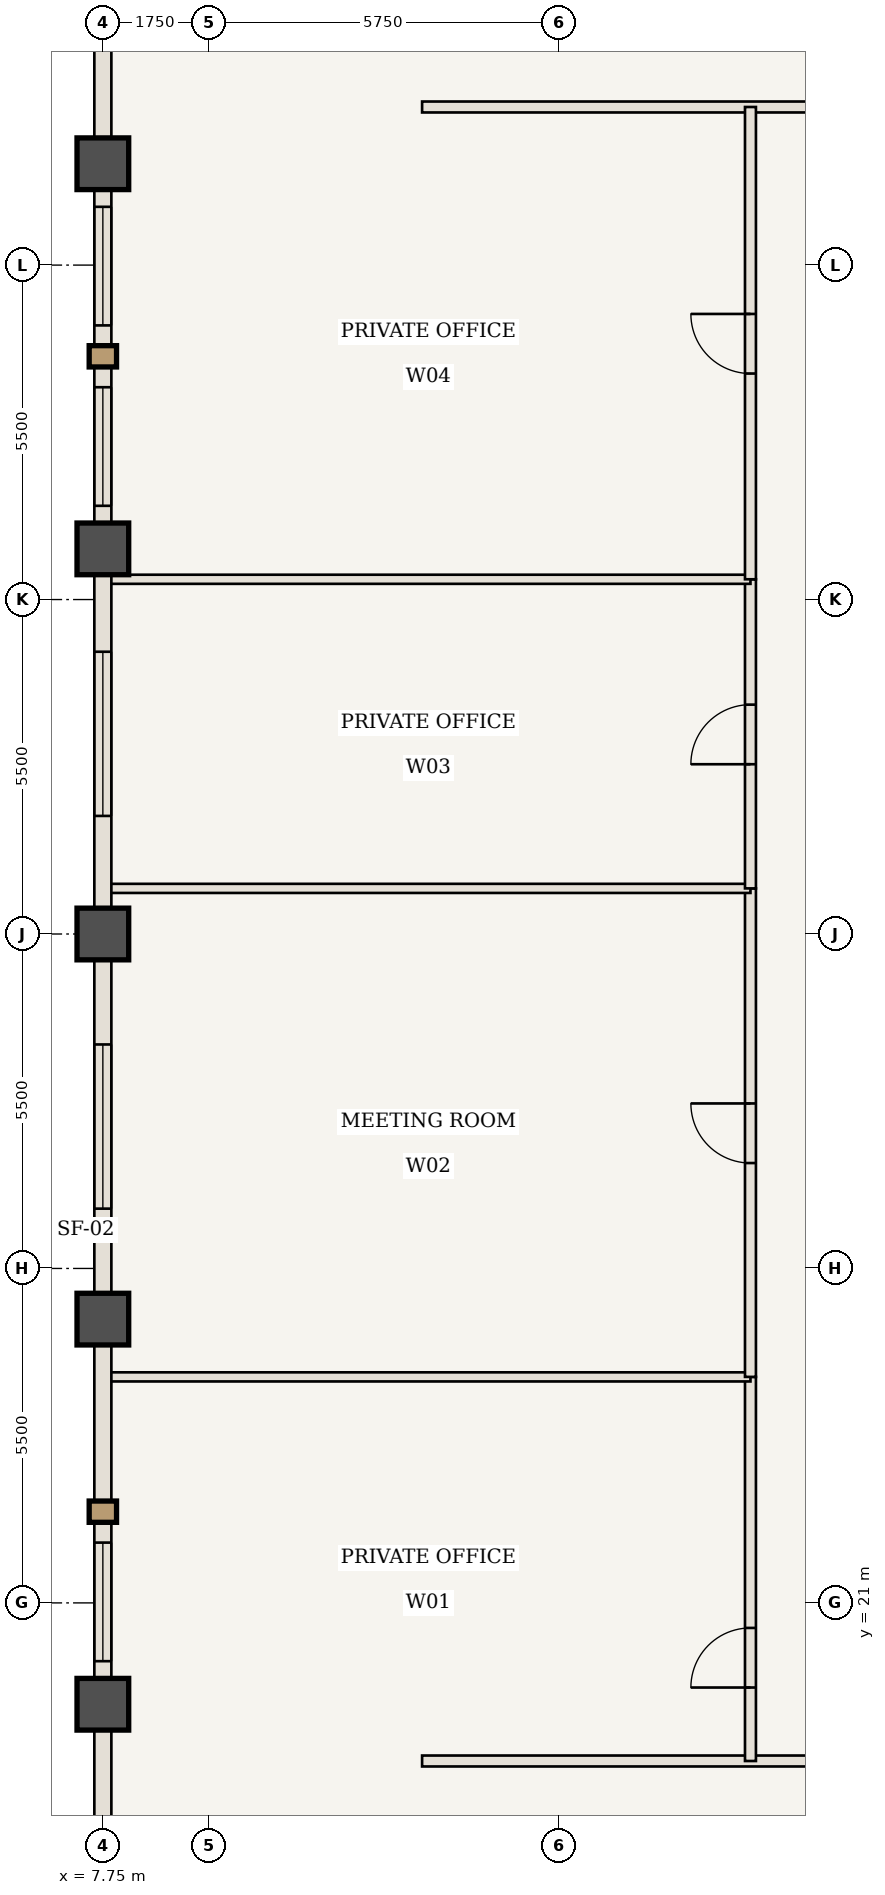
"""IFC4 building model, lengths in metres.
Left out: names, types, materials, properties, quantities, classifications, styles, units other than length and angle.
Written with IfcOpenShell. Run it as: python <this file> out.ifc"""

import sys

from ifc_helpers import new_model, si_unit, direction, frame, frame_2d, origin, origin_2d, place, context, subcontext, project, spatial, rectangle, extrude, element, fill, save


model = new_model("IFC4")
c1 = context("Model", 3, precision=1e-05, world=origin(), true_north=direction((0.0, 1.0)))
c2 = subcontext(c1, "Body", "Model", "MODEL_VIEW")
j1 = project(units=[si_unit("LENGTHUNIT", "METRE"), si_unit("PLANEANGLEUNIT", "RADIAN")], contexts=[c1])
p1 = place(None, origin())
s1 = spatial("IfcSite", under=j1, at=p1, CompositionType="ELEMENT")
p2 = place(p1, origin())
s2 = spatial("IfcBuilding", under=s1, at=p2, CompositionType="ELEMENT")
p3 = place(p2, frame((0.0, 0.0, 190.75)))
s3 = spatial("IfcBuildingStorey", under=s2, at=p3, CompositionType="ELEMENT", Elevation=190.75)
for number, where, z_axis, x_axis in (
    (1, (7.75, 19.333, 0.0), (0.0, 0.0, 1.0), (1.0, 0.0, 0.0)),
    (2, (7.75, 25.667, 0.0), (0.0, 0.0, 1.0), (1.0, 0.0, 0.0)),
    (3, (7.75, 32.0, 0.0), (0.0, 0.0, 1.0), (1.0, 0.0, 0.0)),
    (4, (7.75, 38.333, 0.0), (0.0, 0.0, 1.0), (1.0, 0.0, 0.0)),
    (5, (7.75, 44.667, 0.0), (0.0, 0.0, 1.0), (1.0, 0.0, 0.0)),
):
    element("IfcColumn", number, at=place(p3, frame(where, z_axis=z_axis, x_axis=x_axis)), inside=s3, PredefinedType="COLUMN", context=c2, shape_type="SweptSolid", body=[
        extrude(rectangle(XDim=0.85, YDim=0.85, at=origin_2d()), origin(), (0.0, 0.0, 1.0), 3.85),
    ])
p4 = place(p3, frame((13.0, 18.4, 0.0), z_axis=(0.0, 0.0, 1.0), x_axis=(1.0, 0.0, 0.0)))
e6 = element("IfcWall", 6, at=p4, inside=s3, PredefinedType="STANDARD", context=c2, shape_type="SweptSolid", body=[
    extrude(rectangle(XDim=38.0, YDim=0.18, at=frame_2d((19.0, 0.0))), origin(), (0.0, 0.0, 1.0), 3.685),
])
p5 = place(p4, frame((19.925, 0.0, 0.0)))
e7 = element("IfcOpeningElement", 7, at=p5, cuts=e6, PredefinedType="OPENING", context=c2, shape_type="SweptSolid", body=[
    extrude(rectangle(XDim=0.98, YDim=2.2, at=frame_2d((0.49, 1.1))), frame((0.0, 0.1, 0.0), z_axis=(0.0, -1.0, 0.0), x_axis=(1.0, 0.0, 0.0)), (0.0, 0.0, 1.0), 0.2),
])
p6 = place(p3, frame((13.0, 45.6, 0.0), z_axis=(0.0, 0.0, 1.0), x_axis=(1.0, 0.0, 0.0)))
e8 = element("IfcWall", 8, at=p6, inside=s3, PredefinedType="STANDARD", context=c2, shape_type="SweptSolid", body=[
    extrude(rectangle(XDim=11.717, YDim=0.18, at=frame_2d((5.858, 0.0))), origin(), (0.0, 0.0, 1.0), 3.685),
])
p7 = place(p6, frame((6.608, 0.0, 0.0)))
e9 = element("IfcOpeningElement", 9, at=p7, cuts=e8, PredefinedType="OPENING", context=c2, shape_type="SweptSolid", body=[
    extrude(rectangle(XDim=0.98, YDim=2.2, at=frame_2d((0.49, 1.1))), frame((0.0, 0.1, 0.0), z_axis=(0.0, -1.0, 0.0), x_axis=(1.0, 0.0, 0.0)), (0.0, 0.0, 1.0), 0.2),
])
p8 = place(p3, frame((18.4, 18.4, 0.0), z_axis=(0.0, 0.0, 1.0), x_axis=(0.0, 1.0, 0.0)))
e10 = element("IfcWall", 10, at=p8, inside=s3, PredefinedType="STANDARD", context=c2, shape_type="SweptSolid", body=[
    extrude(rectangle(XDim=6.317, YDim=0.18, at=frame_2d((3.158, 0.0))), origin(), (0.0, 0.0, 1.0), 3.685),
])
p9 = place(p8, frame((1.208, 0.0, 0.0)))
e11 = element("IfcOpeningElement", 11, at=p9, cuts=e10, PredefinedType="OPENING", context=c2, shape_type="SweptSolid", body=[
    extrude(rectangle(XDim=0.98, YDim=2.2, at=frame_2d((0.49, 1.1))), frame((0.0, 0.1, 0.0), z_axis=(0.0, -1.0, 0.0), x_axis=(1.0, 0.0, 0.0)), (0.0, 0.0, 1.0), 0.2),
])
p10 = place(p3, frame((7.81, 24.717, 0.0), z_axis=(0.0, 0.0, 1.0), x_axis=(1.0, 0.0, 0.0)))
e12 = element("IfcWall", 12, at=p10, inside=s3, PredefinedType="STANDARD", context=c2, shape_type="SweptSolid", body=[
    extrude(rectangle(XDim=10.59, YDim=0.15, at=frame_2d((5.295, 0.0))), origin(), (0.0, 0.0, 1.0), 3.685),
])
p11 = place(p3, frame((18.4, 24.717, 0.0), z_axis=(0.0, 0.0, 1.0), x_axis=(0.0, 1.0, 0.0)))
e13 = element("IfcWall", 13, at=p11, inside=s3, PredefinedType="STANDARD", context=c2, shape_type="SweptSolid", body=[
    extrude(rectangle(XDim=8.033, YDim=0.18, at=frame_2d((4.017, 0.0))), origin(), (0.0, 0.0, 1.0), 3.685),
])
p12 = place(p11, frame((3.517, 0.0, 0.0)))
e14 = element("IfcOpeningElement", 14, at=p12, cuts=e13, PredefinedType="OPENING", context=c2, shape_type="SweptSolid", body=[
    extrude(rectangle(XDim=0.98, YDim=2.2, at=frame_2d((0.49, 1.1))), frame((0.0, 0.1, 0.0), z_axis=(0.0, -1.0, 0.0), x_axis=(1.0, 0.0, 0.0)), (0.0, 0.0, 1.0), 0.2),
])
p13 = place(p3, frame((7.81, 32.75, 0.0), z_axis=(0.0, 0.0, 1.0), x_axis=(1.0, 0.0, 0.0)))
e15 = element("IfcWall", 15, at=p13, inside=s3, PredefinedType="STANDARD", context=c2, shape_type="SweptSolid", body=[
    extrude(rectangle(XDim=10.59, YDim=0.15, at=frame_2d((5.295, 0.0))), origin(), (0.0, 0.0, 1.0), 3.685),
])
p14 = place(p3, frame((18.4, 32.75, 0.0), z_axis=(0.0, 0.0, 1.0), x_axis=(0.0, 1.0, 0.0)))
e16 = element("IfcWall", 16, at=p14, inside=s3, PredefinedType="STANDARD", context=c2, shape_type="SweptSolid", body=[
    extrude(rectangle(XDim=5.083, YDim=0.18, at=frame_2d((2.542, 0.0))), origin(), (0.0, 0.0, 1.0), 3.685),
])
p15 = place(p14, frame((2.042, 0.0, 0.0)))
e17 = element("IfcOpeningElement", 17, at=p15, cuts=e16, PredefinedType="OPENING", context=c2, shape_type="SweptSolid", body=[
    extrude(rectangle(XDim=0.98, YDim=2.2, at=frame_2d((0.49, 1.1))), frame((0.0, 0.1, 0.0), z_axis=(0.0, -1.0, 0.0), x_axis=(1.0, 0.0, 0.0)), (0.0, 0.0, 1.0), 0.2),
])
p16 = place(p3, frame((7.81, 37.833, 0.0), z_axis=(0.0, 0.0, 1.0), x_axis=(1.0, 0.0, 0.0)))
e18 = element("IfcWall", 18, at=p16, inside=s3, PredefinedType="STANDARD", context=c2, shape_type="SweptSolid", body=[
    extrude(rectangle(XDim=10.59, YDim=0.15, at=frame_2d((5.295, 0.0))), origin(), (0.0, 0.0, 1.0), 3.685),
])
p17 = place(p3, frame((18.4, 37.833, 0.0), z_axis=(0.0, 0.0, 1.0), x_axis=(0.0, 1.0, 0.0)))
e19 = element("IfcWall", 19, at=p17, inside=s3, PredefinedType="STANDARD", context=c2, shape_type="SweptSolid", body=[
    extrude(rectangle(XDim=7.767, YDim=0.18, at=frame_2d((3.883, 0.0))), origin(), (0.0, 0.0, 1.0), 3.685),
])
p18 = place(p17, frame((3.383, 0.0, 0.0)))
e20 = element("IfcOpeningElement", 20, at=p18, cuts=e19, PredefinedType="OPENING", context=c2, shape_type="SweptSolid", body=[
    extrude(rectangle(XDim=0.98, YDim=2.2, at=frame_2d((0.49, 1.1))), frame((0.0, 0.1, 0.0), z_axis=(0.0, -1.0, 0.0), x_axis=(1.0, 0.0, 0.0)), (0.0, 0.0, 1.0), 0.2),
])
p19 = place(p3, frame((7.75, 13.0, 0.0), z_axis=(0.0, 0.0, 1.0), x_axis=(0.0, 1.0, 0.0)))
e21 = element("IfcWall", 21, at=p19, inside=s3, PredefinedType="USERDEFINED", context=c2, shape_type="SweptSolid", body=[
    extrude(rectangle(XDim=6.333, YDim=0.28, at=frame_2d((3.167, 0.0))), origin(), (0.0, 0.0, 1.0), 2.985),
])
p20 = place(p3, frame((7.75, 19.333, 0.0), z_axis=(0.0, 0.0, 1.0), x_axis=(0.0, 1.0, 0.0)))
e22 = element("IfcWall", 22, at=p20, inside=s3, PredefinedType="USERDEFINED", context=c2, shape_type="SweptSolid", body=[
    extrude(rectangle(XDim=6.333, YDim=0.28, at=frame_2d((3.167, 0.0))), origin(), (0.0, 0.0, 1.0), 2.985),
])
p21 = place(p20, frame((0.708, 0.0, 0.85)))
e23 = element("IfcOpeningElement", 23, at=p21, cuts=e22, PredefinedType="OPENING", context=c2, shape_type="SweptSolid", body=[
    extrude(rectangle(XDim=1.95, YDim=1.935, at=frame_2d((0.975, 0.968))), frame((0.0, 0.15, 0.0), z_axis=(0.0, -1.0, 0.0), x_axis=(1.0, 0.0, 0.0)), (0.0, 0.0, 1.0), 0.3),
])
p22 = place(p3, frame((7.75, 25.667, 0.0), z_axis=(0.0, 0.0, 1.0), x_axis=(0.0, 1.0, 0.0)))
e24 = element("IfcWall", 24, at=p22, inside=s3, PredefinedType="USERDEFINED", context=c2, shape_type="SweptSolid", body=[
    extrude(rectangle(XDim=6.333, YDim=0.28, at=frame_2d((3.167, 0.0))), origin(), (0.0, 0.0, 1.0), 2.985),
])
p23 = place(p22, frame((1.817, 0.0, 0.85)))
e25 = element("IfcOpeningElement", 25, at=p23, cuts=e24, PredefinedType="OPENING", context=c2, shape_type="SweptSolid", body=[
    extrude(rectangle(XDim=2.7, YDim=1.935, at=frame_2d((1.35, 0.968))), frame((0.0, 0.15, 0.0), z_axis=(0.0, -1.0, 0.0), x_axis=(1.0, 0.0, 0.0)), (0.0, 0.0, 1.0), 0.3),
])
p24 = place(p3, frame((7.75, 32.0, 0.0), z_axis=(0.0, 0.0, 1.0), x_axis=(0.0, 1.0, 0.0)))
e26 = element("IfcWall", 26, at=p24, inside=s3, PredefinedType="USERDEFINED", context=c2, shape_type="SweptSolid", body=[
    extrude(rectangle(XDim=6.333, YDim=0.28, at=frame_2d((3.167, 0.0))), origin(), (0.0, 0.0, 1.0), 2.985),
])
p25 = place(p24, frame((1.942, 0.0, 0.85)))
e27 = element("IfcOpeningElement", 27, at=p25, cuts=e26, PredefinedType="OPENING", context=c2, shape_type="SweptSolid", body=[
    extrude(rectangle(XDim=2.7, YDim=1.935, at=frame_2d((1.35, 0.968))), frame((0.0, 0.15, 0.0), z_axis=(0.0, -1.0, 0.0), x_axis=(1.0, 0.0, 0.0)), (0.0, 0.0, 1.0), 0.3),
])
p26 = place(p3, frame((7.75, 38.333, 0.0), z_axis=(0.0, 0.0, 1.0), x_axis=(0.0, 1.0, 0.0)))
e28 = element("IfcWall", 28, at=p26, inside=s3, PredefinedType="USERDEFINED", context=c2, shape_type="SweptSolid", body=[
    extrude(rectangle(XDim=6.333, YDim=0.28, at=frame_2d((3.167, 0.0))), origin(), (0.0, 0.0, 1.0), 2.985),
])
p27 = place(p26, frame((0.708, 0.0, 0.85)))
e29 = element("IfcOpeningElement", 29, at=p27, cuts=e28, PredefinedType="OPENING", context=c2, shape_type="SweptSolid", body=[
    extrude(rectangle(XDim=1.95, YDim=1.935, at=frame_2d((0.975, 0.968))), frame((0.0, 0.15, 0.0), z_axis=(0.0, -1.0, 0.0), x_axis=(1.0, 0.0, 0.0)), (0.0, 0.0, 1.0), 0.3),
])
p28 = place(p26, frame((3.675, 0.0, 0.85)))
e30 = element("IfcOpeningElement", 30, at=p28, cuts=e28, PredefinedType="OPENING", context=c2, shape_type="SweptSolid", body=[
    extrude(rectangle(XDim=1.95, YDim=1.935, at=frame_2d((0.975, 0.968))), frame((0.0, 0.15, 0.0), z_axis=(0.0, -1.0, 0.0), x_axis=(1.0, 0.0, 0.0)), (0.0, 0.0, 1.0), 0.3),
])
p29 = place(p3, frame((7.75, 44.667, 0.0), z_axis=(0.0, 0.0, 1.0), x_axis=(0.0, 1.0, 0.0)))
e31 = element("IfcWall", 31, at=p29, inside=s3, PredefinedType="USERDEFINED", context=c2, shape_type="SweptSolid", body=[
    extrude(rectangle(XDim=6.333, YDim=0.28, at=frame_2d((3.167, 0.0))), origin(), (0.0, 0.0, 1.0), 2.985),
])
p30 = place(p9, origin())
e32 = element("IfcDoor", 32, at=p30, inside=s3, OperationType="SINGLE_SWING_LEFT", PredefinedType="DOOR", context=c2, shape_type="SweptSolid", body=[
    extrude(rectangle(XDim=0.98, YDim=2.2, at=frame_2d((0.49, 1.1))), frame((0.0, 0.025, 0.0), z_axis=(0.0, -1.0, 0.0), x_axis=(1.0, 0.0, 0.0)), (0.0, 0.0, 1.0), 0.05),
])
fill(e11, e32)
p31 = place(p12, origin())
e33 = element("IfcDoor", 33, at=p31, inside=s3, OperationType="SINGLE_SWING_RIGHT", PredefinedType="DOOR", context=c2, shape_type="SweptSolid", body=[
    extrude(rectangle(XDim=0.98, YDim=2.2, at=frame_2d((0.49, 1.1))), frame((0.0, 0.025, 0.0), z_axis=(0.0, -1.0, 0.0), x_axis=(1.0, 0.0, 0.0)), (0.0, 0.0, 1.0), 0.05),
])
fill(e14, e33)
p32 = place(p15, origin())
e34 = element("IfcDoor", 34, at=p32, inside=s3, OperationType="SINGLE_SWING_LEFT", PredefinedType="DOOR", context=c2, shape_type="SweptSolid", body=[
    extrude(rectangle(XDim=0.98, YDim=2.2, at=frame_2d((0.49, 1.1))), frame((0.0, 0.025, 0.0), z_axis=(0.0, -1.0, 0.0), x_axis=(1.0, 0.0, 0.0)), (0.0, 0.0, 1.0), 0.05),
])
fill(e17, e34)
p33 = place(p18, origin())
e35 = element("IfcDoor", 35, at=p33, inside=s3, OperationType="SINGLE_SWING_RIGHT", PredefinedType="DOOR", context=c2, shape_type="SweptSolid", body=[
    extrude(rectangle(XDim=0.98, YDim=2.2, at=frame_2d((0.49, 1.1))), frame((0.0, 0.025, 0.0), z_axis=(0.0, -1.0, 0.0), x_axis=(1.0, 0.0, 0.0)), (0.0, 0.0, 1.0), 0.05),
])
fill(e20, e35)
p34 = place(p21, origin())
e36 = element("IfcWindow", 36, at=p34, inside=s3, PartitioningType="SINGLE_PANEL", PredefinedType="WINDOW", context=c2, shape_type="SweptSolid", body=[
    extrude(rectangle(XDim=1.95, YDim=1.935, at=frame_2d((0.975, 0.968))), frame((0.0, 0.03, 0.0), z_axis=(0.0, -1.0, 0.0), x_axis=(1.0, 0.0, 0.0)), (0.0, 0.0, 1.0), 0.06),
])
fill(e23, e36)
p35 = place(p23, origin())
e37 = element("IfcWindow", 37, at=p35, inside=s3, PartitioningType="SINGLE_PANEL", PredefinedType="WINDOW", context=c2, shape_type="SweptSolid", body=[
    extrude(rectangle(XDim=2.7, YDim=1.935, at=frame_2d((1.35, 0.968))), frame((0.0, 0.03, 0.0), z_axis=(0.0, -1.0, 0.0), x_axis=(1.0, 0.0, 0.0)), (0.0, 0.0, 1.0), 0.06),
])
fill(e25, e37)
p36 = place(p25, origin())
e38 = element("IfcWindow", 38, at=p36, inside=s3, PartitioningType="SINGLE_PANEL", PredefinedType="WINDOW", context=c2, shape_type="SweptSolid", body=[
    extrude(rectangle(XDim=2.7, YDim=1.935, at=frame_2d((1.35, 0.968))), frame((0.0, 0.03, 0.0), z_axis=(0.0, -1.0, 0.0), x_axis=(1.0, 0.0, 0.0)), (0.0, 0.0, 1.0), 0.06),
])
fill(e27, e38)
p37 = place(p27, origin())
e39 = element("IfcWindow", 39, at=p37, inside=s3, PartitioningType="SINGLE_PANEL", PredefinedType="WINDOW", context=c2, shape_type="SweptSolid", body=[
    extrude(rectangle(XDim=1.95, YDim=1.935, at=frame_2d((0.975, 0.968))), frame((0.0, 0.03, 0.0), z_axis=(0.0, -1.0, 0.0), x_axis=(1.0, 0.0, 0.0)), (0.0, 0.0, 1.0), 0.06),
])
fill(e29, e39)
p38 = place(p28, origin())
e40 = element("IfcWindow", 40, at=p38, inside=s3, PartitioningType="SINGLE_PANEL", PredefinedType="WINDOW", context=c2, shape_type="SweptSolid", body=[
    extrude(rectangle(XDim=1.95, YDim=1.935, at=frame_2d((0.975, 0.968))), frame((0.0, 0.03, 0.0), z_axis=(0.0, -1.0, 0.0), x_axis=(1.0, 0.0, 0.0)), (0.0, 0.0, 1.0), 0.06),
])
fill(e30, e40)
save(model, sys.argv[1])
